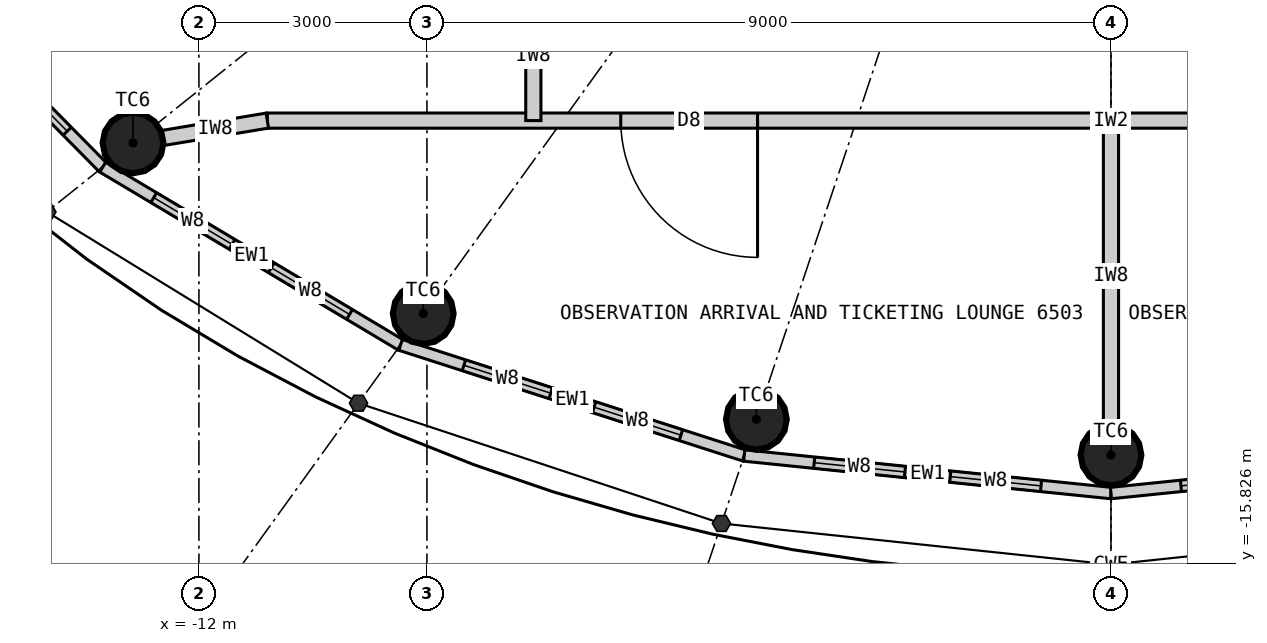
"""IFC4 building model, lengths in metres.
Left out: names, types, materials, properties, quantities, classifications, styles, units other than length and angle.
Written with IfcOpenShell. Run it as: python <this file> out.ifc"""

import sys

from ifc_helpers import new_model, si_unit, direction, frame, frame_2d, origin, origin_2d, place, context, subcontext, project, spatial, rectangle, circle, extrude, element, fill, save


model = new_model("IFC4")
c1 = context("Model", 3, precision=1e-05, world=origin(), true_north=direction((0.0, 1.0)))
c2 = subcontext(c1, "Body", "Model", "MODEL_VIEW")
j1 = project(units=[si_unit("LENGTHUNIT", "METRE"), si_unit("PLANEANGLEUNIT", "RADIAN")], contexts=[c1])
p1 = place(None, origin())
s1 = spatial("IfcSite", under=j1, at=p1, CompositionType="ELEMENT")
p2 = place(p1, origin())
s2 = spatial("IfcBuilding", under=s1, at=p2, CompositionType="ELEMENT")
p3 = place(p2, frame((0.0, 0.0, 242.7)))
s3 = spatial("IfcBuildingStorey", under=s2, at=p3, CompositionType="ELEMENT", Elevation=242.7)
for number, where, z_axis, x_axis in (
    (1, (-12.867, -10.294, 0.0), (0.0, 0.0, 1.0), (1.0, 0.0, 0.0)),
    (2, (-9.049, -12.538, 0.0), (0.0, 0.0, 1.0), (1.0, 0.0, 0.0)),
    (3, (-4.666, -13.929, 0.0), (0.0, 0.0, 1.0), (1.0, 0.0, 0.0)),
    (4, (0.0, -14.4, 0.0), (0.0, 0.0, 1.0), (1.0, 0.0, 0.0)),
):
    element("IfcColumn", number, at=place(p3, frame(where, z_axis=z_axis, x_axis=x_axis)), inside=s3, PredefinedType="COLUMN", context=c2, shape_type="SweptSolid", body=[
        extrude(circle(Radius=0.4, at=origin_2d()), origin(), (0.0, 0.0, 1.0), 6.0),
    ])
p4 = place(p3, frame((-16.307, -7.532, 0.0), z_axis=(0.0, 0.0, 1.0), x_axis=(0.702523956258, -0.711660095048, 0.0)))
e5 = element("IfcWall", 5, at=p4, inside=s3, PredefinedType="ELEMENTEDWALL", context=c2, shape_type="SweptSolid", body=[
    extrude(rectangle(XDim=4.329, YDim=0.15, at=frame_2d((2.165, 0.0))), origin(), (0.0, 0.0, 1.0), 5.7),
])
p5 = place(p4, frame((0.665, 0.0, 0.5)))
e6 = element("IfcOpeningElement", 6, at=p5, cuts=e5, PredefinedType="OPENING", context=c2, shape_type="SweptSolid", body=[
    extrude(rectangle(XDim=1.2, YDim=4.2, at=frame_2d((0.6, 2.1))), frame((0.0, 0.085, 0.0), z_axis=(0.0, -1.0, 0.0), x_axis=(1.0, 0.0, 0.0)), (0.0, 0.0, 1.0), 0.17),
])
p6 = place(p4, frame((2.465, 0.0, 0.5)))
e7 = element("IfcOpeningElement", 7, at=p6, cuts=e5, PredefinedType="OPENING", context=c2, shape_type="SweptSolid", body=[
    extrude(rectangle(XDim=1.2, YDim=4.2, at=frame_2d((0.6, 2.1))), frame((0.0, 0.085, 0.0), z_axis=(0.0, -1.0, 0.0), x_axis=(1.0, 0.0, 0.0)), (0.0, 0.0, 1.0), 0.17),
])
p7 = place(p3, frame((-13.266, -10.613, 0.0), z_axis=(0.0, 0.0, 1.0), x_axis=(0.858849230109, -0.512228464594, 0.0)))
e8 = element("IfcWall", 8, at=p7, inside=s3, PredefinedType="ELEMENTEDWALL", context=c2, shape_type="SweptSolid", body=[
    extrude(rectangle(XDim=4.564, YDim=0.15, at=frame_2d((2.282, 0.0))), origin(), (0.0, 0.0, 1.0), 5.7),
])
p8 = place(p7, frame((0.782, 0.0, 0.5)))
e9 = element("IfcOpeningElement", 9, at=p8, cuts=e8, PredefinedType="OPENING", context=c2, shape_type="SweptSolid", body=[
    extrude(rectangle(XDim=1.2, YDim=4.2, at=frame_2d((0.6, 2.1))), frame((0.0, 0.085, 0.0), z_axis=(0.0, -1.0, 0.0), x_axis=(1.0, 0.0, 0.0)), (0.0, 0.0, 1.0), 0.17),
])
p9 = place(p7, frame((2.582, 0.0, 0.5)))
e10 = element("IfcOpeningElement", 10, at=p9, cuts=e8, PredefinedType="OPENING", context=c2, shape_type="SweptSolid", body=[
    extrude(rectangle(XDim=1.2, YDim=4.2, at=frame_2d((0.6, 2.1))), frame((0.0, 0.085, 0.0), z_axis=(0.0, -1.0, 0.0), x_axis=(1.0, 0.0, 0.0)), (0.0, 0.0, 1.0), 0.17),
])
p10 = place(p3, frame((-9.346, -12.951, 0.0), z_axis=(0.0, 0.0, 1.0), x_axis=(0.951881908824, -0.306465057804, 0.0)))
e11 = element("IfcWall", 11, at=p10, inside=s3, PredefinedType="ELEMENTEDWALL", context=c2, shape_type="SweptSolid", body=[
    extrude(rectangle(XDim=4.75, YDim=0.15, at=frame_2d((2.375, 0.0))), origin(), (0.0, 0.0, 1.0), 5.7),
])
p11 = place(p10, frame((0.875, 0.0, 0.5)))
e12 = element("IfcOpeningElement", 12, at=p11, cuts=e11, PredefinedType="OPENING", context=c2, shape_type="SweptSolid", body=[
    extrude(rectangle(XDim=1.2, YDim=4.2, at=frame_2d((0.6, 2.1))), frame((0.0, 0.085, 0.0), z_axis=(0.0, -1.0, 0.0), x_axis=(1.0, 0.0, 0.0)), (0.0, 0.0, 1.0), 0.17),
])
p12 = place(p10, frame((2.675, 0.0, 0.5)))
e13 = element("IfcOpeningElement", 13, at=p12, cuts=e11, PredefinedType="OPENING", context=c2, shape_type="SweptSolid", body=[
    extrude(rectangle(XDim=1.2, YDim=4.2, at=frame_2d((0.6, 2.1))), frame((0.0, 0.085, 0.0), z_axis=(0.0, -1.0, 0.0), x_axis=(1.0, 0.0, 0.0)), (0.0, 0.0, 1.0), 0.17),
])
p13 = place(p3, frame((-4.825, -14.406, 0.0), z_axis=(0.0, 0.0, 1.0), x_axis=(0.994807343212, -0.10177597895, 0.0)))
e14 = element("IfcWall", 14, at=p13, inside=s3, PredefinedType="ELEMENTEDWALL", context=c2, shape_type="SweptSolid", body=[
    extrude(rectangle(XDim=4.85, YDim=0.15, at=frame_2d((2.425, 0.0))), origin(), (0.0, 0.0, 1.0), 5.7),
])
p14 = place(p13, frame((0.925, 0.0, 0.5)))
e15 = element("IfcOpeningElement", 15, at=p14, cuts=e14, PredefinedType="OPENING", context=c2, shape_type="SweptSolid", body=[
    extrude(rectangle(XDim=1.2, YDim=4.2, at=frame_2d((0.6, 2.1))), frame((0.0, 0.085, 0.0), z_axis=(0.0, -1.0, 0.0), x_axis=(1.0, 0.0, 0.0)), (0.0, 0.0, 1.0), 0.17),
])
p15 = place(p13, frame((2.725, 0.0, 0.5)))
e16 = element("IfcOpeningElement", 16, at=p15, cuts=e14, PredefinedType="OPENING", context=c2, shape_type="SweptSolid", body=[
    extrude(rectangle(XDim=1.2, YDim=4.2, at=frame_2d((0.6, 2.1))), frame((0.0, 0.085, 0.0), z_axis=(0.0, -1.0, 0.0), x_axis=(1.0, 0.0, 0.0)), (0.0, 0.0, 1.0), 0.17),
])
p16 = place(p3, frame((0.0, -14.9, 0.0), z_axis=(0.0, 0.0, 1.0), x_axis=(0.994807343212, 0.10177597895, 0.0)))
e17 = element("IfcWall", 17, at=p16, inside=s3, PredefinedType="ELEMENTEDWALL", context=c2, shape_type="SweptSolid", body=[
    extrude(rectangle(XDim=4.85, YDim=0.15, at=frame_2d((2.425, 0.0))), origin(), (0.0, 0.0, 1.0), 5.7),
])
p17 = place(p16, frame((0.925, 0.0, 0.5)))
e18 = element("IfcOpeningElement", 18, at=p17, cuts=e17, PredefinedType="OPENING", context=c2, shape_type="SweptSolid", body=[
    extrude(rectangle(XDim=1.2, YDim=4.2, at=frame_2d((0.6, 2.1))), frame((0.0, 0.085, 0.0), z_axis=(0.0, -1.0, 0.0), x_axis=(1.0, 0.0, 0.0)), (0.0, 0.0, 1.0), 0.17),
])
p18 = place(p16, frame((2.725, 0.0, 0.5)))
e19 = element("IfcOpeningElement", 19, at=p18, cuts=e17, PredefinedType="OPENING", context=c2, shape_type="SweptSolid", body=[
    extrude(rectangle(XDim=1.2, YDim=4.2, at=frame_2d((0.6, 2.1))), frame((0.0, 0.085, 0.0), z_axis=(0.0, -1.0, 0.0), x_axis=(1.0, 0.0, 0.0)), (0.0, 0.0, 1.0), 0.17),
])
p19 = place(p3, frame((11.1, -10.0, 0.0), z_axis=(0.0, 0.0, 1.0), x_axis=(-1.0, 0.0, 0.0)))
e20 = element("IfcWall", 20, at=p19, inside=s3, PredefinedType="PARTITIONING", context=c2, shape_type="SweptSolid", body=[
    extrude(rectangle(XDim=22.2, YDim=0.2, at=frame_2d((11.1, 0.0))), origin(), (0.0, 0.0, 1.0), 5.7),
])
p20 = place(p19, frame((4.65, 0.0, 0.0)))
e21 = element("IfcOpeningElement", 21, at=p20, cuts=e20, PredefinedType="OPENING", context=c2, shape_type="SweptSolid", body=[
    extrude(rectangle(XDim=1.8, YDim=2.4, at=frame_2d((0.9, 1.2))), frame((0.0, 0.11, 0.0), z_axis=(0.0, -1.0, 0.0), x_axis=(1.0, 0.0, 0.0)), (0.0, 0.0, 1.0), 0.22),
])
p21 = place(p19, frame((15.75, 0.0, 0.0)))
e22 = element("IfcOpeningElement", 22, at=p21, cuts=e20, PredefinedType="OPENING", context=c2, shape_type="SweptSolid", body=[
    extrude(rectangle(XDim=1.8, YDim=2.4, at=frame_2d((0.9, 1.2))), frame((0.0, 0.11, 0.0), z_axis=(0.0, -1.0, 0.0), x_axis=(1.0, 0.0, 0.0)), (0.0, 0.0, 1.0), 0.22),
])
p22 = place(p3, frame((0.0, -10.1, 0.0), z_axis=(0.0, 0.0, 1.0), x_axis=(0.0, -1.0, 0.0)))
e23 = element("IfcWall", 23, at=p22, inside=s3, PredefinedType="PARTITIONING", context=c2, shape_type="SweptSolid", body=[
    extrude(rectangle(XDim=3.9, YDim=0.2, at=frame_2d((1.95, 0.0))), origin(), (0.0, 0.0, 1.0), 4.85),
])
p23 = place(p3, frame((-7.6, -8.3, 0.0), z_axis=(0.0, 0.0, 1.0), x_axis=(0.0, -1.0, 0.0)))
e24 = element("IfcWall", 24, at=p23, inside=s3, PredefinedType="PARTITIONING", context=c2, shape_type="SweptSolid", body=[
    extrude(rectangle(XDim=1.7, YDim=0.2, at=frame_2d((0.85, 0.0))), origin(), (0.0, 0.0, 1.0), 5.7),
])
p24 = place(p3, frame((-11.1, -10.0, 0.0), z_axis=(0.0, 0.0, 1.0), x_axis=(-0.986474439415, -0.163915162144, 0.0)))
e25 = element("IfcWall", 25, at=p24, inside=s3, PredefinedType="PARTITIONING", context=c2, shape_type="SweptSolid", body=[
    extrude(rectangle(XDim=1.391, YDim=0.2, at=frame_2d((0.696, 0.0))), origin(), (0.0, 0.0, 1.0), 4.85),
])
p25 = place(p6, origin())
e26 = element("IfcWindow", 26, at=p25, inside=s3, PartitioningType="SINGLE_PANEL", PredefinedType="WINDOW", context=c2, shape_type="SweptSolid", body=[
    extrude(rectangle(XDim=1.2, YDim=4.2, at=frame_2d((0.6, 2.1))), frame((0.0, 0.03, 0.0), z_axis=(0.0, -1.0, 0.0), x_axis=(1.0, 0.0, 0.0)), (0.0, 0.0, 1.0), 0.06),
])
fill(e7, e26)
p26 = place(p8, origin())
e27 = element("IfcWindow", 27, at=p26, inside=s3, PartitioningType="SINGLE_PANEL", PredefinedType="WINDOW", context=c2, shape_type="SweptSolid", body=[
    extrude(rectangle(XDim=1.2, YDim=4.2, at=frame_2d((0.6, 2.1))), frame((0.0, 0.03, 0.0), z_axis=(0.0, -1.0, 0.0), x_axis=(1.0, 0.0, 0.0)), (0.0, 0.0, 1.0), 0.06),
])
fill(e9, e27)
p27 = place(p9, origin())
e28 = element("IfcWindow", 28, at=p27, inside=s3, PartitioningType="SINGLE_PANEL", PredefinedType="WINDOW", context=c2, shape_type="SweptSolid", body=[
    extrude(rectangle(XDim=1.2, YDim=4.2, at=frame_2d((0.6, 2.1))), frame((0.0, 0.03, 0.0), z_axis=(0.0, -1.0, 0.0), x_axis=(1.0, 0.0, 0.0)), (0.0, 0.0, 1.0), 0.06),
])
fill(e10, e28)
p28 = place(p11, origin())
e29 = element("IfcWindow", 29, at=p28, inside=s3, PartitioningType="SINGLE_PANEL", PredefinedType="WINDOW", context=c2, shape_type="SweptSolid", body=[
    extrude(rectangle(XDim=1.2, YDim=4.2, at=frame_2d((0.6, 2.1))), frame((0.0, 0.03, 0.0), z_axis=(0.0, -1.0, 0.0), x_axis=(1.0, 0.0, 0.0)), (0.0, 0.0, 1.0), 0.06),
])
fill(e12, e29)
p29 = place(p12, origin())
e30 = element("IfcWindow", 30, at=p29, inside=s3, PartitioningType="SINGLE_PANEL", PredefinedType="WINDOW", context=c2, shape_type="SweptSolid", body=[
    extrude(rectangle(XDim=1.2, YDim=4.2, at=frame_2d((0.6, 2.1))), frame((0.0, 0.03, 0.0), z_axis=(0.0, -1.0, 0.0), x_axis=(1.0, 0.0, 0.0)), (0.0, 0.0, 1.0), 0.06),
])
fill(e13, e30)
p30 = place(p14, origin())
e31 = element("IfcWindow", 31, at=p30, inside=s3, PartitioningType="SINGLE_PANEL", PredefinedType="WINDOW", context=c2, shape_type="SweptSolid", body=[
    extrude(rectangle(XDim=1.2, YDim=4.2, at=frame_2d((0.6, 2.1))), frame((0.0, 0.03, 0.0), z_axis=(0.0, -1.0, 0.0), x_axis=(1.0, 0.0, 0.0)), (0.0, 0.0, 1.0), 0.06),
])
fill(e15, e31)
p31 = place(p15, origin())
e32 = element("IfcWindow", 32, at=p31, inside=s3, PartitioningType="SINGLE_PANEL", PredefinedType="WINDOW", context=c2, shape_type="SweptSolid", body=[
    extrude(rectangle(XDim=1.2, YDim=4.2, at=frame_2d((0.6, 2.1))), frame((0.0, 0.03, 0.0), z_axis=(0.0, -1.0, 0.0), x_axis=(1.0, 0.0, 0.0)), (0.0, 0.0, 1.0), 0.06),
])
fill(e16, e32)
p32 = place(p17, origin())
e33 = element("IfcWindow", 33, at=p32, inside=s3, PartitioningType="SINGLE_PANEL", PredefinedType="WINDOW", context=c2, shape_type="SweptSolid", body=[
    extrude(rectangle(XDim=1.2, YDim=4.2, at=frame_2d((0.6, 2.1))), frame((0.0, 0.03, 0.0), z_axis=(0.0, -1.0, 0.0), x_axis=(1.0, 0.0, 0.0)), (0.0, 0.0, 1.0), 0.06),
])
fill(e18, e33)
p33 = place(p21, origin())
e34 = element("IfcDoor", 34, at=p33, inside=s3, OperationType="DOUBLE_DOOR_DOUBLE_SWING", PredefinedType="DOOR", context=c2, shape_type="SweptSolid", body=[
    extrude(rectangle(XDim=1.8, YDim=2.4, at=frame_2d((0.9, 1.2))), frame((0.0, 0.025, 0.0), z_axis=(0.0, -1.0, 0.0), x_axis=(1.0, 0.0, 0.0)), (0.0, 0.0, 1.0), 0.05),
])
fill(e22, e34)
save(model, sys.argv[1])
